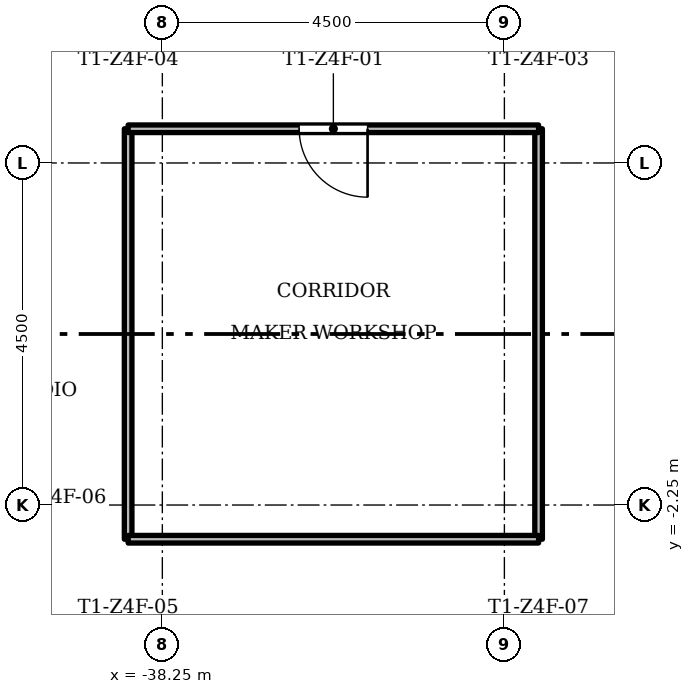
"""IFC4 building model, lengths in metres.
Left out: names, types, materials, properties, quantities, classifications, styles, units other than length and angle.
Written with IfcOpenShell. Run it as: python <this file> out.ifc"""

import sys

from ifc_helpers import new_model, si_unit, direction, frame, frame_2d, origin, place, context, subcontext, project, spatial, rectangle, extrude, element, fill, save


model = new_model("IFC4")
c1 = context("Model", 3, precision=1e-05, world=origin(), true_north=direction((0.0, 1.0)))
c2 = subcontext(c1, "Body", "Model", "MODEL_VIEW")
j1 = project(units=[si_unit("LENGTHUNIT", "METRE"), si_unit("PLANEANGLEUNIT", "RADIAN")], contexts=[c1])
p1 = place(None, origin())
s1 = spatial("IfcSite", under=j1, at=p1, CompositionType="ELEMENT")
p2 = place(p1, origin())
s2 = spatial("IfcBuilding", under=s1, at=p2, CompositionType="ELEMENT")
p3 = place(p2, frame((0.0, 0.0, 216.4)))
s3 = spatial("IfcBuildingStorey", under=s2, at=p3, CompositionType="ELEMENT", Elevation=216.4)
for number, where, z_axis, x_axis in (
    (1, (-38.7, -2.7, 0.0), (0.0, 0.0, 1.0), (0.0, 1.0, 0.0)),
    (2, (-33.3, -2.7, 0.0), (0.0, 0.0, 1.0), (0.0, 1.0, 0.0)),
    (3, (-38.7, -2.7, 0.0), (0.0, 0.0, 1.0), (1.0, 0.0, 0.0)),
):
    element("IfcWall", number, at=place(p3, frame(where, z_axis=z_axis, x_axis=x_axis)), inside=s3, PredefinedType="PARTITIONING", context=c2, shape_type="SweptSolid", body=[
        extrude(rectangle(XDim=5.4, YDim=0.1, at=frame_2d((2.7, 0.0))), origin(), (0.0, 0.0, 1.0), 3.0),
    ])
p4 = place(p3, frame((-38.7, 2.7, 0.0), z_axis=(0.0, 0.0, 1.0), x_axis=(1.0, 0.0, 0.0)))
e4 = element("IfcWall", 4, at=p4, inside=s3, PredefinedType="PARTITIONING", context=c2, shape_type="SweptSolid", body=[
    extrude(rectangle(XDim=5.4, YDim=0.1, at=frame_2d((2.7, 0.0))), origin(), (0.0, 0.0, 1.0), 3.0),
])
p5 = place(p4, frame((2.25, 0.0, 0.0)))
e5 = element("IfcOpeningElement", 5, at=p5, cuts=e4, PredefinedType="OPENING", context=c2, shape_type="SweptSolid", body=[
    extrude(rectangle(XDim=0.9, YDim=2.1, at=frame_2d((0.45, 1.05))), frame((0.0, 0.06, 0.0), z_axis=(0.0, -1.0, 0.0), x_axis=(1.0, 0.0, 0.0)), (0.0, 0.0, 1.0), 0.12),
])
p6 = place(p5, origin())
e6 = element("IfcDoor", 6, at=p6, inside=s3, OperationType="SINGLE_SWING_RIGHT", PredefinedType="DOOR", context=c2, shape_type="SweptSolid", body=[
    extrude(rectangle(XDim=0.9, YDim=2.1, at=frame_2d((0.45, 1.05))), frame((0.0, 0.025, 0.0), z_axis=(0.0, -1.0, 0.0), x_axis=(1.0, 0.0, 0.0)), (0.0, 0.0, 1.0), 0.05),
])
fill(e5, e6)
save(model, sys.argv[1])
